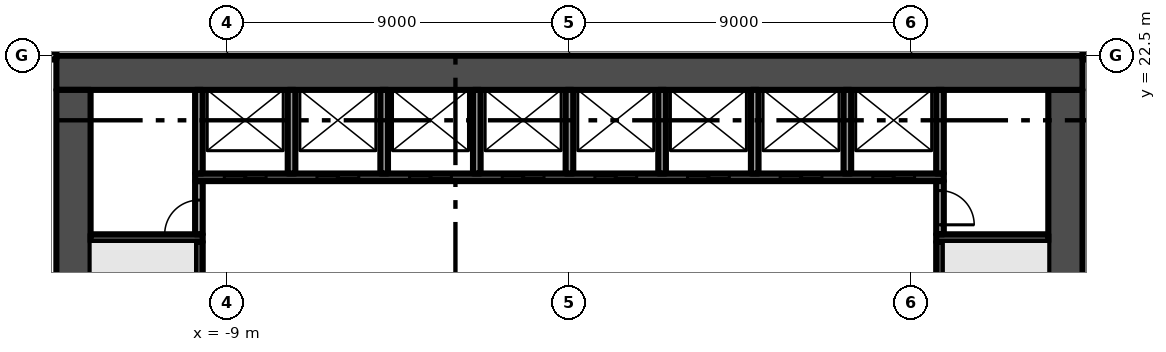
"""IFC4 building model, lengths in metres.
Left out: names, types, materials, properties, quantities, classifications, styles, units other than length and angle.
Written with IfcOpenShell. Run it as: python <this file> out.ifc"""

import sys

from ifc_helpers import new_model, si_unit, direction, frame, frame_2d, origin, place, context, subcontext, project, spatial, rectangle, extrude, element, fill, save


model = new_model("IFC4")
c1 = context("Model", 3, precision=1e-05, world=origin(), true_north=direction((0.0, 1.0)))
c2 = subcontext(c1, "Body", "Model", "MODEL_VIEW")
j1 = project(units=[si_unit("LENGTHUNIT", "METRE"), si_unit("PLANEANGLEUNIT", "RADIAN")], contexts=[c1])
p1 = place(None, origin())
s1 = spatial("IfcSite", under=j1, at=p1, CompositionType="ELEMENT")
p2 = place(p1, origin())
s2 = spatial("IfcBuilding", under=s1, at=p2, CompositionType="ELEMENT")
p3 = place(p2, origin())
s3 = spatial("IfcBuildingStorey", under=s2, at=p3, CompositionType="ELEMENT", Elevation=0.0)
p4 = place(p3, frame((13.05, 5.4, -2.2), z_axis=(0.0, 0.0, 1.0), x_axis=(0.0, 1.0, 0.0)))
e1 = element("IfcWall", 1, at=p4, inside=s3, PredefinedType="SHEAR", context=c2, shape_type="SweptSolid", body=[
    extrude(rectangle(XDim=16.2, YDim=0.9, at=frame_2d((8.1, 0.0))), origin(), (0.0, 0.0, 1.0), 7.8),
])
p5 = place(p4, frame((6.0, 0.0, 2.2)))
e2 = element("IfcOpeningElement", 2, at=p5, cuts=e1, PredefinedType="OPENING", context=c2, shape_type="SweptSolid", body=[
    extrude(rectangle(XDim=1.2, YDim=2.2, at=frame_2d((0.6, 1.1))), frame((0.0, 0.46, 0.0), z_axis=(0.0, -1.0, 0.0), x_axis=(1.0, 0.0, 0.0)), (0.0, 0.0, 1.0), 0.92),
])
p6 = place(p3, frame((13.5, 22.05, -2.2), z_axis=(0.0, 0.0, 1.0), x_axis=(-1.0, 0.0, 0.0)))
e3 = element("IfcWall", 3, at=p6, inside=s3, PredefinedType="SHEAR", context=c2, shape_type="SweptSolid", body=[
    extrude(rectangle(XDim=27.0, YDim=0.9, at=frame_2d((13.5, 0.0))), origin(), (0.0, 0.0, 1.0), 7.8),
])
p7 = place(p3, frame((-13.05, 21.6, -2.2), z_axis=(0.0, 0.0, 1.0), x_axis=(0.0, -1.0, 0.0)))
e4 = element("IfcWall", 4, at=p7, inside=s3, PredefinedType="SHEAR", context=c2, shape_type="SweptSolid", body=[
    extrude(rectangle(XDim=16.2, YDim=0.9, at=frame_2d((8.1, 0.0))), origin(), (0.0, 0.0, 1.0), 7.8),
])
p8 = place(p7, frame((9.0, 0.0, 2.2)))
e5 = element("IfcOpeningElement", 5, at=p8, cuts=e4, PredefinedType="OPENING", context=c2, shape_type="SweptSolid", body=[
    extrude(rectangle(XDim=1.2, YDim=2.2, at=frame_2d((0.6, 1.1))), frame((0.0, 0.46, 0.0), z_axis=(0.0, -1.0, 0.0), x_axis=(1.0, 0.0, 0.0)), (0.0, 0.0, 1.0), 0.92),
])
p9 = place(p3, frame((-12.6, 17.7, -0.4), z_axis=(0.0, 0.0, 1.0), x_axis=(1.0, 0.0, 0.0)))
e6 = element("IfcWall", 6, at=p9, inside=s3, PredefinedType="SHEAR", context=c2, shape_type="SweptSolid", body=[
    extrude(rectangle(XDim=2.95, YDim=0.2, at=frame_2d((1.475, 0.0))), origin(), (0.0, 0.0, 1.0), 6.0),
])
p10 = place(p3, frame((-9.75, 16.1, -0.4), z_axis=(0.0, 0.0, 1.0), x_axis=(0.0, 1.0, 0.0)))
e7 = element("IfcWall", 7, at=p10, inside=s3, PredefinedType="SHEAR", context=c2, shape_type="SweptSolid", body=[
    extrude(rectangle(XDim=1.5, YDim=0.2, at=frame_2d((0.75, 0.0))), origin(), (0.0, 0.0, 1.0), 6.0),
])
p11 = place(p3, frame((-9.75, 17.8, 0.0), z_axis=(0.0, 0.0, 1.0), x_axis=(0.0, 1.0, 0.0)))
e8 = element("IfcWall", 8, at=p11, inside=s3, PredefinedType="PARTITIONING", context=c2, shape_type="SweptSolid", body=[
    extrude(rectangle(XDim=1.4, YDim=0.2, at=frame_2d((0.7, 0.0))), origin(), (0.0, 0.0, 1.0), 5.6),
])
p12 = place(p11, origin())
e9 = element("IfcOpeningElement", 9, at=p12, cuts=e8, PredefinedType="OPENING", context=c2, shape_type="SweptSolid", body=[
    extrude(rectangle(XDim=0.9, YDim=2.1, at=frame_2d((0.45, 1.05))), frame((0.0, 0.11, 0.0), z_axis=(0.0, -1.0, 0.0), x_axis=(1.0, 0.0, 0.0)), (0.0, 0.0, 1.0), 0.22),
])
p13 = place(p3, frame((-9.85, 19.3, -0.4), z_axis=(0.0, 0.0, 1.0), x_axis=(1.0, 0.0, 0.0)))
e10 = element("IfcWall", 10, at=p13, inside=s3, PredefinedType="SHEAR", context=c2, shape_type="SweptSolid", body=[
    extrude(rectangle(XDim=19.7, YDim=0.2, at=frame_2d((9.85, 0.0))), origin(), (0.0, 0.0, 1.0), 6.0),
])
p14 = place(p13, frame((0.769, 0.0, 0.4)))
e11 = element("IfcOpeningElement", 11, at=p14, cuts=e10, PredefinedType="OPENING", context=c2, shape_type="SweptSolid", body=[
    extrude(rectangle(XDim=1.1, YDim=2.1, at=frame_2d((0.55, 1.05))), frame((0.0, 0.11, 0.0), z_axis=(0.0, -1.0, 0.0), x_axis=(1.0, 0.0, 0.0)), (0.0, 0.0, 1.0), 0.22),
])
p15 = place(p13, frame((3.206, 0.0, 0.4)))
e12 = element("IfcOpeningElement", 12, at=p15, cuts=e10, PredefinedType="OPENING", context=c2, shape_type="SweptSolid", body=[
    extrude(rectangle(XDim=1.1, YDim=2.1, at=frame_2d((0.55, 1.05))), frame((0.0, 0.11, 0.0), z_axis=(0.0, -1.0, 0.0), x_axis=(1.0, 0.0, 0.0)), (0.0, 0.0, 1.0), 0.22),
])
p16 = place(p13, frame((5.644, 0.0, 0.4)))
e13 = element("IfcOpeningElement", 13, at=p16, cuts=e10, PredefinedType="OPENING", context=c2, shape_type="SweptSolid", body=[
    extrude(rectangle(XDim=1.1, YDim=2.1, at=frame_2d((0.55, 1.05))), frame((0.0, 0.11, 0.0), z_axis=(0.0, -1.0, 0.0), x_axis=(1.0, 0.0, 0.0)), (0.0, 0.0, 1.0), 0.22),
])
p17 = place(p13, frame((8.081, 0.0, 0.4)))
e14 = element("IfcOpeningElement", 14, at=p17, cuts=e10, PredefinedType="OPENING", context=c2, shape_type="SweptSolid", body=[
    extrude(rectangle(XDim=1.1, YDim=2.1, at=frame_2d((0.55, 1.05))), frame((0.0, 0.11, 0.0), z_axis=(0.0, -1.0, 0.0), x_axis=(1.0, 0.0, 0.0)), (0.0, 0.0, 1.0), 0.22),
])
p18 = place(p13, frame((10.519, 0.0, 0.4)))
e15 = element("IfcOpeningElement", 15, at=p18, cuts=e10, PredefinedType="OPENING", context=c2, shape_type="SweptSolid", body=[
    extrude(rectangle(XDim=1.1, YDim=2.1, at=frame_2d((0.55, 1.05))), frame((0.0, 0.11, 0.0), z_axis=(0.0, -1.0, 0.0), x_axis=(1.0, 0.0, 0.0)), (0.0, 0.0, 1.0), 0.22),
])
p19 = place(p13, frame((12.956, 0.0, 0.4)))
e16 = element("IfcOpeningElement", 16, at=p19, cuts=e10, PredefinedType="OPENING", context=c2, shape_type="SweptSolid", body=[
    extrude(rectangle(XDim=1.1, YDim=2.1, at=frame_2d((0.55, 1.05))), frame((0.0, 0.11, 0.0), z_axis=(0.0, -1.0, 0.0), x_axis=(1.0, 0.0, 0.0)), (0.0, 0.0, 1.0), 0.22),
])
p20 = place(p13, frame((15.394, 0.0, 0.4)))
e17 = element("IfcOpeningElement", 17, at=p20, cuts=e10, PredefinedType="OPENING", context=c2, shape_type="SweptSolid", body=[
    extrude(rectangle(XDim=1.1, YDim=2.1, at=frame_2d((0.55, 1.05))), frame((0.0, 0.11, 0.0), z_axis=(0.0, -1.0, 0.0), x_axis=(1.0, 0.0, 0.0)), (0.0, 0.0, 1.0), 0.22),
])
p21 = place(p13, frame((17.831, 0.0, 0.4)))
e18 = element("IfcOpeningElement", 18, at=p21, cuts=e10, PredefinedType="OPENING", context=c2, shape_type="SweptSolid", body=[
    extrude(rectangle(XDim=1.1, YDim=2.1, at=frame_2d((0.55, 1.05))), frame((0.0, 0.11, 0.0), z_axis=(0.0, -1.0, 0.0), x_axis=(1.0, 0.0, 0.0)), (0.0, 0.0, 1.0), 0.22),
])
for number, where, z_axis, x_axis in (
    (19, (-9.75, 19.4, -0.4), (0.0, 0.0, 1.0), (0.0, 1.0, 0.0)),
    (20, (-7.312, 19.4, -0.4), (0.0, 0.0, 1.0), (0.0, 1.0, 0.0)),
    (21, (-4.875, 19.4, -0.4), (0.0, 0.0, 1.0), (0.0, 1.0, 0.0)),
    (22, (-2.438, 19.4, -0.4), (0.0, 0.0, 1.0), (0.0, 1.0, 0.0)),
    (23, (0.0, 19.4, -0.4), (0.0, 0.0, 1.0), (0.0, 1.0, 0.0)),
    (24, (2.438, 19.4, -0.4), (0.0, 0.0, 1.0), (0.0, 1.0, 0.0)),
    (25, (4.875, 19.4, -0.4), (0.0, 0.0, 1.0), (0.0, 1.0, 0.0)),
    (26, (7.312, 19.4, -0.4), (0.0, 0.0, 1.0), (0.0, 1.0, 0.0)),
):
    element("IfcWall", number, at=place(p3, frame(where, z_axis=z_axis, x_axis=x_axis)), inside=s3, PredefinedType="PARTITIONING", context=c2, shape_type="SweptSolid", body=[
        extrude(rectangle(XDim=2.2, YDim=0.2, at=frame_2d((1.1, 0.0))), origin(), (0.0, 0.0, 1.0), 6.0),
    ])
p22 = place(p3, frame((9.75, 16.1, -0.4), z_axis=(0.0, 0.0, 1.0), x_axis=(0.0, 1.0, 0.0)))
e27 = element("IfcWall", 27, at=p22, inside=s3, PredefinedType="SHEAR", context=c2, shape_type="SweptSolid", body=[
    extrude(rectangle(XDim=1.5, YDim=0.2, at=frame_2d((0.75, 0.0))), origin(), (0.0, 0.0, 1.0), 6.0),
])
p23 = place(p3, frame((9.65, 17.7, -0.4), z_axis=(0.0, 0.0, 1.0), x_axis=(1.0, 0.0, 0.0)))
e28 = element("IfcWall", 28, at=p23, inside=s3, PredefinedType="SHEAR", context=c2, shape_type="SweptSolid", body=[
    extrude(rectangle(XDim=2.95, YDim=0.2, at=frame_2d((1.475, 0.0))), origin(), (0.0, 0.0, 1.0), 6.0),
])
p24 = place(p3, frame((9.75, 19.2, 0.0), z_axis=(0.0, 0.0, 1.0), x_axis=(0.0, -1.0, 0.0)))
e29 = element("IfcWall", 29, at=p24, inside=s3, PredefinedType="PARTITIONING", context=c2, shape_type="SweptSolid", body=[
    extrude(rectangle(XDim=1.4, YDim=0.2, at=frame_2d((0.7, 0.0))), origin(), (0.0, 0.0, 1.0), 5.6),
])
p25 = place(p24, frame((0.25, 0.0, 0.0)))
e30 = element("IfcOpeningElement", 30, at=p25, cuts=e29, PredefinedType="OPENING", context=c2, shape_type="SweptSolid", body=[
    extrude(rectangle(XDim=0.9, YDim=2.1, at=frame_2d((0.45, 1.05))), frame((0.0, 0.11, 0.0), z_axis=(0.0, -1.0, 0.0), x_axis=(1.0, 0.0, 0.0)), (0.0, 0.0, 1.0), 0.22),
])
p26 = place(p3, frame((9.75, 19.4, -0.4), z_axis=(0.0, 0.0, 1.0), x_axis=(0.0, 1.0, 0.0)))
e31 = element("IfcWall", 31, at=p26, inside=s3, PredefinedType="PARTITIONING", context=c2, shape_type="SweptSolid", body=[
    extrude(rectangle(XDim=2.2, YDim=0.2, at=frame_2d((1.1, 0.0))), origin(), (0.0, 0.0, 1.0), 6.0),
])
p27 = place(p3, frame((-17.25, 22.5, 0.0), z_axis=(0.0, 0.0, 1.0), x_axis=(1.0, 0.0, 0.0)))
e32 = element("IfcWall", 32, at=p27, inside=s3, PredefinedType="PARTITIONING", context=c2, shape_type="SweptSolid", body=[
    extrude(rectangle(XDim=3.75, YDim=0.2, at=frame_2d((1.875, 0.0))), origin(), (0.0, 0.0, 1.0), 5.6),
])
p28 = place(p3, frame((17.25, 22.5, 0.0), z_axis=(0.0, 0.0, 1.0), x_axis=(-1.0, 0.0, 0.0)))
e33 = element("IfcWall", 33, at=p28, inside=s3, PredefinedType="PARTITIONING", context=c2, shape_type="SweptSolid", body=[
    extrude(rectangle(XDim=3.75, YDim=0.2, at=frame_2d((1.875, 0.0))), origin(), (0.0, 0.0, 1.0), 5.6),
])
p29 = place(p28, frame((0.15, 0.0, 0.0)))
e34 = element("IfcOpeningElement", 34, at=p29, cuts=e33, PredefinedType="OPENING", context=c2, shape_type="SweptSolid", body=[
    extrude(rectangle(XDim=1.2, YDim=2.4, at=frame_2d((0.6, 1.2))), frame((0.0, 0.11, 0.0), z_axis=(0.0, -1.0, 0.0), x_axis=(1.0, 0.0, 0.0)), (0.0, 0.0, 1.0), 0.22),
])
p30 = place(p14, origin())
e35 = element("IfcDoor", 35, at=p30, inside=s3, OperationType="SLIDING_TO_LEFT", PredefinedType="DOOR", context=c2, shape_type="SweptSolid", body=[
    extrude(rectangle(XDim=1.1, YDim=2.1, at=frame_2d((0.55, 1.05))), frame((0.0, 0.025, 0.0), z_axis=(0.0, -1.0, 0.0), x_axis=(1.0, 0.0, 0.0)), (0.0, 0.0, 1.0), 0.05),
])
fill(e11, e35)
p31 = place(p15, origin())
e36 = element("IfcDoor", 36, at=p31, inside=s3, OperationType="SLIDING_TO_LEFT", PredefinedType="DOOR", context=c2, shape_type="SweptSolid", body=[
    extrude(rectangle(XDim=1.1, YDim=2.1, at=frame_2d((0.55, 1.05))), frame((0.0, 0.025, 0.0), z_axis=(0.0, -1.0, 0.0), x_axis=(1.0, 0.0, 0.0)), (0.0, 0.0, 1.0), 0.05),
])
fill(e12, e36)
p32 = place(p16, origin())
e37 = element("IfcDoor", 37, at=p32, inside=s3, OperationType="SLIDING_TO_LEFT", PredefinedType="DOOR", context=c2, shape_type="SweptSolid", body=[
    extrude(rectangle(XDim=1.1, YDim=2.1, at=frame_2d((0.55, 1.05))), frame((0.0, 0.025, 0.0), z_axis=(0.0, -1.0, 0.0), x_axis=(1.0, 0.0, 0.0)), (0.0, 0.0, 1.0), 0.05),
])
fill(e13, e37)
p33 = place(p17, origin())
e38 = element("IfcDoor", 38, at=p33, inside=s3, OperationType="SLIDING_TO_LEFT", PredefinedType="DOOR", context=c2, shape_type="SweptSolid", body=[
    extrude(rectangle(XDim=1.1, YDim=2.1, at=frame_2d((0.55, 1.05))), frame((0.0, 0.025, 0.0), z_axis=(0.0, -1.0, 0.0), x_axis=(1.0, 0.0, 0.0)), (0.0, 0.0, 1.0), 0.05),
])
fill(e14, e38)
p34 = place(p18, origin())
e39 = element("IfcDoor", 39, at=p34, inside=s3, OperationType="SLIDING_TO_RIGHT", PredefinedType="DOOR", context=c2, shape_type="SweptSolid", body=[
    extrude(rectangle(XDim=1.1, YDim=2.1, at=frame_2d((0.55, 1.05))), frame((0.0, 0.025, 0.0), z_axis=(0.0, -1.0, 0.0), x_axis=(1.0, 0.0, 0.0)), (0.0, 0.0, 1.0), 0.05),
])
fill(e15, e39)
p35 = place(p19, origin())
e40 = element("IfcDoor", 40, at=p35, inside=s3, OperationType="SLIDING_TO_RIGHT", PredefinedType="DOOR", context=c2, shape_type="SweptSolid", body=[
    extrude(rectangle(XDim=1.1, YDim=2.1, at=frame_2d((0.55, 1.05))), frame((0.0, 0.025, 0.0), z_axis=(0.0, -1.0, 0.0), x_axis=(1.0, 0.0, 0.0)), (0.0, 0.0, 1.0), 0.05),
])
fill(e16, e40)
p36 = place(p20, origin())
e41 = element("IfcDoor", 41, at=p36, inside=s3, OperationType="SLIDING_TO_RIGHT", PredefinedType="DOOR", context=c2, shape_type="SweptSolid", body=[
    extrude(rectangle(XDim=1.1, YDim=2.1, at=frame_2d((0.55, 1.05))), frame((0.0, 0.025, 0.0), z_axis=(0.0, -1.0, 0.0), x_axis=(1.0, 0.0, 0.0)), (0.0, 0.0, 1.0), 0.05),
])
fill(e17, e41)
p37 = place(p21, origin())
e42 = element("IfcDoor", 42, at=p37, inside=s3, OperationType="SLIDING_TO_RIGHT", PredefinedType="DOOR", context=c2, shape_type="SweptSolid", body=[
    extrude(rectangle(XDim=1.1, YDim=2.1, at=frame_2d((0.55, 1.05))), frame((0.0, 0.025, 0.0), z_axis=(0.0, -1.0, 0.0), x_axis=(1.0, 0.0, 0.0)), (0.0, 0.0, 1.0), 0.05),
])
fill(e18, e42)
p38 = place(p12, origin())
e43 = element("IfcDoor", 43, at=p38, inside=s3, OperationType="SINGLE_SWING_LEFT", PredefinedType="DOOR", context=c2, shape_type="SweptSolid", body=[
    extrude(rectangle(XDim=0.9, YDim=2.1, at=frame_2d((0.45, 1.05))), frame((0.0, 0.025, 0.0), z_axis=(0.0, -1.0, 0.0), x_axis=(1.0, 0.0, 0.0)), (0.0, 0.0, 1.0), 0.05),
])
fill(e9, e43)
p39 = place(p25, origin())
e44 = element("IfcDoor", 44, at=p39, inside=s3, OperationType="SINGLE_SWING_RIGHT", PredefinedType="DOOR", context=c2, shape_type="SweptSolid", body=[
    extrude(rectangle(XDim=0.9, YDim=2.1, at=frame_2d((0.45, 1.05))), frame((0.0, 0.025, 0.0), z_axis=(0.0, -1.0, 0.0), x_axis=(1.0, 0.0, 0.0)), (0.0, 0.0, 1.0), 0.05),
])
fill(e30, e44)
save(model, sys.argv[1])
